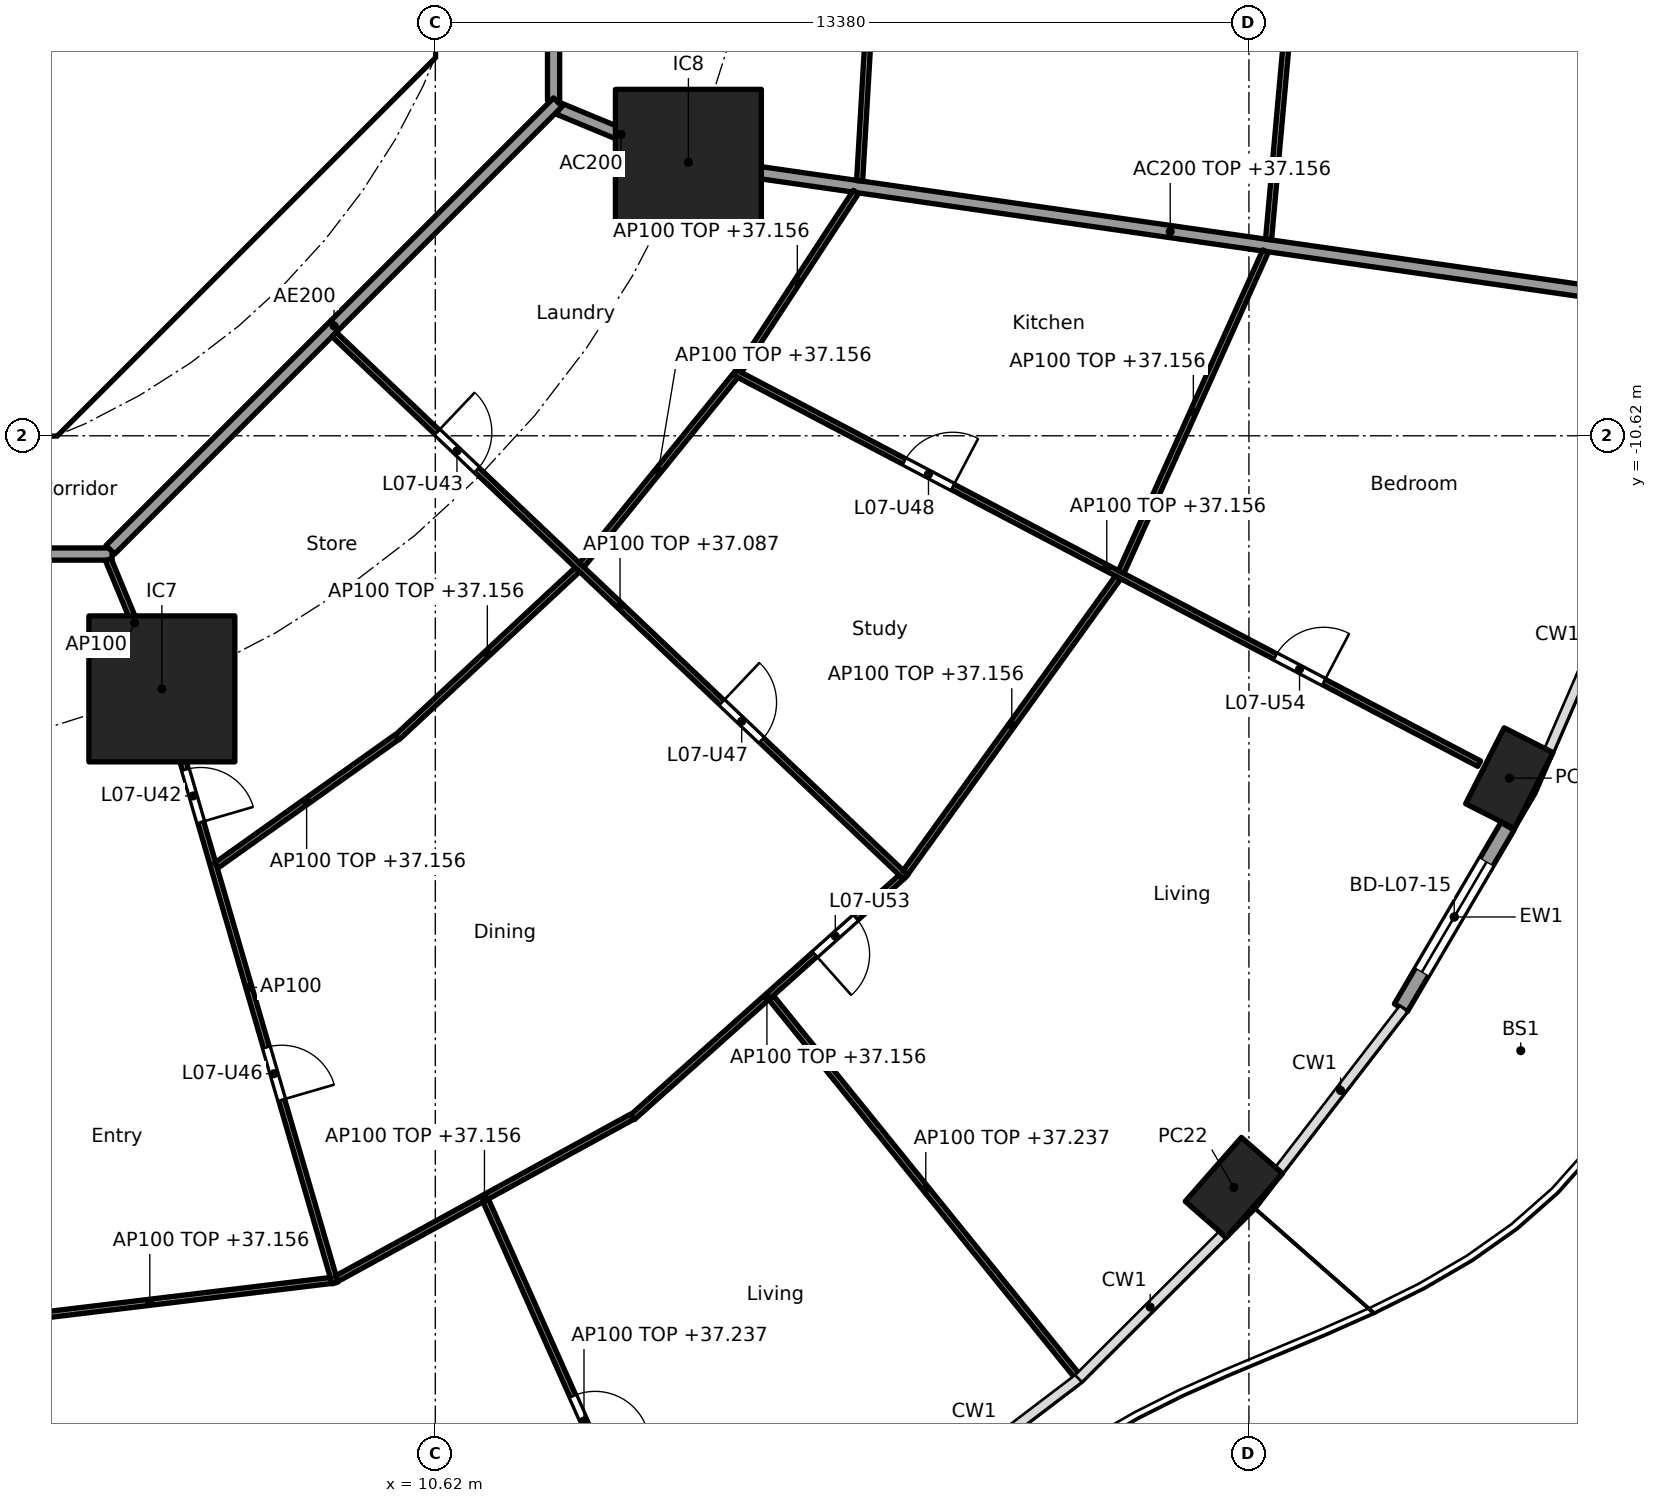
"""IFC4 building model, lengths in metres.
Left out: names, types, materials, properties, quantities, classifications, styles, units other than length and angle.
Written with IfcOpenShell. Run it as: python <this file> out.ifc"""

import sys

from ifc_helpers import new_model, si_unit, direction, frame, frame_2d, origin, origin_2d, place, context, subcontext, project, spatial, polyline, rectangle, hollow_rectangle, outline, extrude, element, fill, save


model = new_model("IFC4")
c1 = context("Model", 3, precision=1e-05, world=origin(), true_north=direction((0.0, 1.0)))
c2 = subcontext(c1, "Body", "Model", "MODEL_VIEW")
j1 = project(units=[si_unit("LENGTHUNIT", "METRE"), si_unit("PLANEANGLEUNIT", "RADIAN")], contexts=[c1])
p1 = place(None, origin())
s1 = spatial("IfcSite", under=j1, at=p1, CompositionType="ELEMENT")
p2 = place(p1, origin())
s2 = spatial("IfcBuilding", under=s1, at=p2, CompositionType="ELEMENT")
p3 = place(p2, frame((0.0, 0.0, 34.4)))
s3 = spatial("IfcBuildingStorey", under=s2, at=p3, CompositionType="ELEMENT", Elevation=34.4)
for number, where, z_axis, x_axis in (
    (1, (23.752, -22.981, 0.0), (0.0, 0.0, 1.0), (0.66, 0.751, 0.0)),
    (2, (28.282, -16.25, 0.0), (0.0, 0.0, 1.0), (0.452, 0.892, 0.0)),
):
    element("IfcColumn", number, at=place(p3, frame(where, z_axis=z_axis, x_axis=x_axis)), inside=s3, PredefinedType="COLUMN", context=c2, shape_type="SweptSolid", body=[
        extrude(hollow_rectangle(XDim=1.4, YDim=0.9, WallThickness=0.05, at=origin_2d()), origin(), (0.0, 0.0, 1.0), 3.7),
    ])
for number, where, z_axis, x_axis in (
    (3, (6.123, -14.782, 0.0), (0.0, 0.0, 1.0), (1.0, 0.0, 0.0)),
    (4, (14.782, -6.123, 0.0), (0.0, 0.0, 1.0), (1.0, 0.0, 0.0)),
):
    element("IfcColumn", number, at=place(p3, frame(where, z_axis=z_axis, x_axis=x_axis)), inside=s3, PredefinedType="COLUMN", context=c2, shape_type="SweptSolid", body=[
        extrude(rectangle(XDim=2.4, YDim=2.4, at=origin_2d()), origin(), (0.0, 0.0, 1.0), 3.7),
    ])
p4 = place(p3, frame((28.252, -17.04, 0.0), z_axis=(0.0, 0.0, 1.0), x_axis=(-0.506311160839, -0.862350861546, 0.0)))
e5 = element("IfcWall", 5, at=p4, inside=s3, PredefinedType="SOLIDWALL", context=c2, shape_type="SweptSolid", body=[
    extrude(rectangle(XDim=3.462, YDim=0.25, at=frame_2d((1.731, 0.0))), origin(), (0.0, 0.0, 1.0), 3.44),
])
p5 = place(p4, frame((0.681, 0.0, 0.0)))
e6 = element("IfcOpeningElement", 6, at=p5, cuts=e5, PredefinedType="OPENING", context=c2, shape_type="SweptSolid", body=[
    extrude(rectangle(XDim=2.1, YDim=2.4, at=frame_2d((1.05, 1.2))), frame((0.0, 0.135, 0.0), z_axis=(0.0, -1.0, 0.0), x_axis=(1.0, 0.0, 0.0)), (0.0, 0.0, 1.0), 0.27),
])
p6 = place(p3, frame((4.613, -9.988, 0.0), z_axis=(0.0, 0.0, 1.0), x_axis=(0.707106781187, 0.707106781187, 0.0)))
e7 = element("IfcWall", 7, at=p6, inside=s3, PredefinedType="SHEAR", context=c2, shape_type="SweptSolid", body=[
    extrude(rectangle(XDim=7.602, YDim=0.6, at=frame_2d((3.801, 0.0))), origin(), (0.0, 0.0, 1.0), 3.44),
])
p7 = place(p6, frame((3.201, 0.0, 0.0)))
e8 = element("IfcOpeningElement", 8, at=p7, cuts=e7, PredefinedType="OPENING", context=c2, shape_type="SweptSolid", body=[
    extrude(rectangle(XDim=1.2, YDim=2.1, at=frame_2d((0.6, 1.05))), frame((0.0, 0.31, 0.0), z_axis=(0.0, -1.0, 0.0), x_axis=(1.0, 0.0, 0.0)), (0.0, 0.0, 1.0), 0.62),
])
p8 = place(p3, origin())
e9 = element("IfcWall", 9, at=p8, inside=s3, PredefinedType="SHEAR", context=c2, shape_type="SweptSolid", body=[
    extrude(outline(polyline([(-4.152, -10.025), (4.152, -10.025), (4.401, -9.776), (4.825, -10.2), (4.401, -10.625), (-4.401, -10.625), (-4.825, -10.2), (-4.401, -9.776), (-4.152, -10.025)])), origin(), (0.0, 0.0, 1.0), 3.44),
])
p9 = place(p3, origin())
e10 = element("IfcWall", 10, at=p9, inside=s3, PredefinedType="SHEAR", context=c2, shape_type="SweptSolid", body=[
    extrude(outline(polyline([(9.776, -4.401), (10.025, -4.152), (10.025, -3.801), (10.025, 4.152), (9.776, 4.401), (10.2, 4.825), (10.625, 4.401), (10.625, -4.401), (10.2, -4.825), (9.776, -4.401)])), origin(), (0.0, 0.0, 1.0), 3.44),
])
p10 = place(p3, frame((12.657, -5.243, 0.0), z_axis=(0.0, 0.0, 1.0), x_axis=(0.923853160736, -0.382747093259, 0.0)))
e11 = element("IfcWall", 11, at=p10, inside=s3, PredefinedType="PARTITIONING", context=c2, shape_type="SweptSolid", body=[
    extrude(rectangle(XDim=2.2, YDim=0.2, at=frame_2d((1.1, 0.0))), origin(), (0.0, 0.0, 1.0), 3.44),
])
p11 = place(p3, frame((14.832, -6.13, 0.0), z_axis=(0.0, 0.0, 1.0), x_axis=(0.989836541293, -0.142209779978, 0.0)))
e12 = element("IfcWall", 12, at=p11, inside=s3, PredefinedType="PARTITIONING", context=c2, shape_type="SweptSolid", body=[
    extrude(rectangle(XDim=15.909, YDim=0.2, at=frame_2d((7.955, 0.0))), origin(), (0.0, 0.0, 1.0), 2.756),
])
p12 = place(p3, frame((12.565, -5.104, 0.0), z_axis=(0.0, 0.0, 1.0), x_axis=(0.0, 1.0, 0.0)))
e13 = element("IfcWall", 13, at=p12, inside=s3, PredefinedType="PARTITIONING", context=c2, shape_type="SweptSolid", body=[
    extrude(rectangle(XDim=10.209, YDim=0.2, at=frame_2d((5.104, 0.0))), origin(), (0.0, 0.0, 1.0), 3.44),
])
p13 = place(p3, frame((-5.104, -12.565, 0.0), z_axis=(0.0, 0.0, 1.0), x_axis=(1.0, 0.0, 0.0)))
e14 = element("IfcWall", 14, at=p13, inside=s3, PredefinedType="PARTITIONING", context=c2, shape_type="SweptSolid", body=[
    extrude(rectangle(XDim=10.409, YDim=0.2, at=frame_2d((5.205, 0.0))), origin(), (0.0, 0.0, 1.0), 3.44),
])
p14 = place(p13, frame((8.074, 0.0, 0.0)))
e15 = element("IfcOpeningElement", 15, at=p14, cuts=e14, PredefinedType="OPENING", context=c2, shape_type="SweptSolid", body=[
    extrude(rectangle(XDim=1.0, YDim=2.1, at=frame_2d((0.5, 1.05))), frame((0.0, 0.11, 0.0), z_axis=(0.0, -1.0, 0.0), x_axis=(1.0, 0.0, 0.0)), (0.0, 0.0, 1.0), 0.22),
])
p15 = place(p3, frame((5.275, -12.494, 0.0), z_axis=(0.0, 0.0, 1.0), x_axis=(0.707106781187, 0.707106781187, 0.0)))
e16 = element("IfcWall", 16, at=p15, inside=s3, PredefinedType="PARTITIONING", context=c2, shape_type="SweptSolid", body=[
    extrude(rectangle(XDim=10.409, YDim=0.2, at=frame_2d((5.205, 0.0))), origin(), (0.0, 0.0, 1.0), 3.44),
])
p16 = place(p3, frame((17.977, 0.05, 0.0), z_axis=(0.0, 0.0, 1.0), x_axis=(-0.058516864568, -0.998286420103, 0.0)))
e17 = element("IfcWall", 17, at=p16, inside=s3, PredefinedType="PARTITIONING", context=c2, shape_type="SweptSolid", body=[
    extrude(rectangle(XDim=6.488, YDim=0.1, at=frame_2d((3.244, 0.0))), origin(), (0.0, 0.0, 1.0), 2.756),
])
p17 = place(p3, frame((24.982, -0.05, 0.0), z_axis=(0.0, 0.0, 1.0), x_axis=(-0.08944290521, -0.995991951126, 0.0)))
e18 = element("IfcWall", 18, at=p17, inside=s3, PredefinedType="PARTITIONING", context=c2, shape_type="SweptSolid", body=[
    extrude(rectangle(XDim=7.373, YDim=0.1, at=frame_2d((3.686, 0.0))), origin(), (0.0, 0.0, 1.0), 2.756),
])
p18 = place(p17, frame((3.236, 0.0, 0.0)))
e19 = element("IfcOpeningElement", 19, at=p18, cuts=e18, PredefinedType="OPENING", context=c2, shape_type="SweptSolid", body=[
    extrude(rectangle(XDim=0.9, YDim=2.1, at=frame_2d((0.45, 1.05))), frame((0.0, 0.06, 0.0), z_axis=(0.0, -1.0, 0.0), x_axis=(1.0, 0.0, 0.0)), (0.0, 0.0, 1.0), 0.12),
])
p19 = place(p3, frame((2.941, -25.229, 0.0), z_axis=(0.0, 0.0, 1.0), x_axis=(0.992836798252, 0.119478416615, 0.0)))
e20 = element("IfcWall", 20, at=p19, inside=s3, PredefinedType="PARTITIONING", context=c2, shape_type="SweptSolid", body=[
    extrude(rectangle(XDim=6.01, YDim=0.1, at=frame_2d((3.005, 0.0))), origin(), (0.0, 0.0, 1.0), 2.756),
])
p20 = place(p3, frame((5.243, -12.657, 0.0), z_axis=(0.0, 0.0, 1.0), x_axis=(0.382719158442, -0.923864733477, 0.0)))
e21 = element("IfcWall", 21, at=p20, inside=s3, PredefinedType="PARTITIONING", context=c2, shape_type="SweptSolid", body=[
    extrude(rectangle(XDim=2.25, YDim=0.1, at=frame_2d((1.125, 0.0))), origin(), (0.0, 0.0, 1.0), 3.44),
])
p21 = place(p3, frame((6.137, -14.83, 0.0), z_axis=(0.0, 0.0, 1.0), x_axis=(0.279843546189, -0.960045618529, 0.0)))
e22 = element("IfcWall", 22, at=p21, inside=s3, PredefinedType="PARTITIONING", context=c2, shape_type="SweptSolid", body=[
    extrude(rectangle(XDim=10.127, YDim=0.1, at=frame_2d((5.063, 0.0))), origin(), (0.0, 0.0, 1.0), 3.44),
])
p22 = place(p21, frame((1.334, 0.0, 0.0)))
e23 = element("IfcOpeningElement", 23, at=p22, cuts=e22, PredefinedType="OPENING", context=c2, shape_type="SweptSolid", body=[
    extrude(rectangle(XDim=0.9, YDim=2.1, at=frame_2d((0.45, 1.05))), frame((0.0, 0.06, 0.0), z_axis=(0.0, -1.0, 0.0), x_axis=(1.0, 0.0, 0.0)), (0.0, 0.0, 1.0), 0.12),
])
p23 = place(p21, frame((6.091, 0.0, 0.0)))
e24 = element("IfcOpeningElement", 24, at=p23, cuts=e22, PredefinedType="OPENING", context=c2, shape_type="SweptSolid", body=[
    extrude(rectangle(XDim=0.9, YDim=2.1, at=frame_2d((0.45, 1.05))), frame((0.0, 0.06, 0.0), z_axis=(0.0, -1.0, 0.0), x_axis=(1.0, 0.0, 0.0)), (0.0, 0.0, 1.0), 0.12),
])
p24 = place(p3, frame((7.019, -17.686, 0.0), z_axis=(0.0, 0.0, 1.0), x_axis=(0.81494477814, 0.57953861699, 0.0)))
e25 = element("IfcWall", 25, at=p24, inside=s3, PredefinedType="PARTITIONING", context=c2, shape_type="SweptSolid", body=[
    extrude(rectangle(XDim=3.644, YDim=0.1, at=frame_2d((1.822, 0.0))), origin(), (0.0, 0.0, 1.0), 2.756),
])
p25 = place(p3, frame((9.001, -24.48, 0.0), z_axis=(0.0, 0.0, 1.0), x_axis=(0.876794415294, 0.480865421203, 0.0)))
e26 = element("IfcWall", 26, at=p25, inside=s3, PredefinedType="PARTITIONING", context=c2, shape_type="SweptSolid", body=[
    extrude(rectangle(XDim=5.536, YDim=0.1, at=frame_2d((2.768, 0.0))), origin(), (0.0, 0.0, 1.0), 2.756),
])
p26 = place(p3, frame((11.448, -23.195, 0.0), z_axis=(0.0, 0.0, 1.0), x_axis=(0.407016520798, -0.913420796675, 0.0)))
e27 = element("IfcWall", 27, at=p26, inside=s3, PredefinedType="PARTITIONING", context=c2, shape_type="SweptSolid", body=[
    extrude(rectangle(XDim=7.944, YDim=0.1, at=frame_2d((3.972, 0.0))), origin(), (0.0, 0.0, 1.0), 2.837),
])
p27 = place(p26, frame((3.522, 0.0, 0.0)))
e28 = element("IfcOpeningElement", 28, at=p27, cuts=e27, PredefinedType="OPENING", context=c2, shape_type="SweptSolid", body=[
    extrude(rectangle(XDim=0.9, YDim=2.1, at=frame_2d((0.45, 1.05))), frame((0.0, 0.06, 0.0), z_axis=(0.0, -1.0, 0.0), x_axis=(1.0, 0.0, 0.0)), (0.0, 0.0, 1.0), 0.12),
])
p28 = place(p3, frame((9.993, -15.579, 0.0), z_axis=(0.0, 0.0, 1.0), x_axis=(0.732028724098, 0.681273768096, 0.0)))
e29 = element("IfcWall", 29, at=p28, inside=s3, PredefinedType="PARTITIONING", context=c2, shape_type="SweptSolid", body=[
    extrude(rectangle(XDim=4.05, YDim=0.1, at=frame_2d((2.025, 0.0))), origin(), (0.0, 0.0, 1.0), 2.756),
])
p29 = place(p3, frame((13.862, -21.828, 0.0), z_axis=(0.0, 0.0, 1.0), x_axis=(0.745812746724, 0.666155647596, 0.0)))
e30 = element("IfcWall", 30, at=p29, inside=s3, PredefinedType="PARTITIONING", context=c2, shape_type="SweptSolid", body=[
    extrude(rectangle(XDim=5.931, YDim=0.1, at=frame_2d((2.965, 0.0))), origin(), (0.0, 0.0, 1.0), 2.756),
])
p30 = place(p29, frame((4.023, 0.0, 0.0)))
e31 = element("IfcOpeningElement", 31, at=p30, cuts=e30, PredefinedType="OPENING", context=c2, shape_type="SweptSolid", body=[
    extrude(rectangle(XDim=0.9, YDim=2.1, at=frame_2d((0.45, 1.05))), frame((0.0, 0.06, 0.0), z_axis=(0.0, -1.0, 0.0), x_axis=(1.0, 0.0, 0.0)), (0.0, 0.0, 1.0), 0.12),
])
p31 = place(p3, frame((16.142, -19.858, 0.0), z_axis=(0.0, 0.0, 1.0), x_axis=(0.628738066508, -0.777617157555, 0.0)))
e32 = element("IfcWall", 32, at=p31, inside=s3, PredefinedType="PARTITIONING", context=c2, shape_type="SweptSolid", body=[
    extrude(rectangle(XDim=8.091, YDim=0.1, at=frame_2d((4.045, 0.0))), origin(), (0.0, 0.0, 1.0), 2.837),
])
p32 = place(p3, frame((8.957, -8.953, 0.0), z_axis=(0.0, 0.0, 1.0), x_axis=(0.725250022034, -0.688485588476, 0.0)))
e33 = element("IfcWall", 33, at=p32, inside=s3, PredefinedType="PARTITIONING", context=c2, shape_type="SweptSolid", body=[
    extrude(rectangle(XDim=12.963, YDim=0.1, at=frame_2d((6.481, 0.0))), origin(), (0.0, 0.0, 1.0), 2.687),
])
p33 = place(p32, frame((2.333, 0.0, 0.0)))
e34 = element("IfcOpeningElement", 34, at=p33, cuts=e33, PredefinedType="OPENING", context=c2, shape_type="SweptSolid", body=[
    extrude(rectangle(XDim=0.9, YDim=2.1, at=frame_2d((0.45, 1.05))), frame((0.0, 0.06, 0.0), z_axis=(0.0, -1.0, 0.0), x_axis=(1.0, 0.0, 0.0)), (0.0, 0.0, 1.0), 0.12),
])
p34 = place(p32, frame((8.79, 0.0, 0.0)))
e35 = element("IfcOpeningElement", 35, at=p34, cuts=e33, PredefinedType="OPENING", context=c2, shape_type="SweptSolid", body=[
    extrude(rectangle(XDim=0.9, YDim=2.1, at=frame_2d((0.45, 1.05))), frame((0.0, 0.06, 0.0), z_axis=(0.0, -1.0, 0.0), x_axis=(1.0, 0.0, 0.0)), (0.0, 0.0, 1.0), 0.12),
])
p35 = place(p3, frame((13.026, -12.747, 0.0), z_axis=(0.0, 0.0, 1.0), x_axis=(0.630126826288, 0.776492229705, 0.0)))
e36 = element("IfcWall", 36, at=p35, inside=s3, PredefinedType="PARTITIONING", context=c2, shape_type="SweptSolid", body=[
    extrude(rectangle(XDim=4.007, YDim=0.1, at=frame_2d((2.003, 0.0))), origin(), (0.0, 0.0, 1.0), 2.756),
])
p36 = place(p3, frame((18.351, -17.803, 0.0), z_axis=(0.0, 0.0, 1.0), x_axis=(0.584563700282, 0.811347817099, 0.0)))
e37 = element("IfcWall", 37, at=p36, inside=s3, PredefinedType="PARTITIONING", context=c2, shape_type="SweptSolid", body=[
    extrude(rectangle(XDim=5.984, YDim=0.1, at=frame_2d((2.992, 0.0))), origin(), (0.0, 0.0, 1.0), 2.756),
])
p37 = place(p3, frame((15.538, -9.574, 0.0), z_axis=(0.0, 0.0, 1.0), x_axis=(0.885181406501, -0.465246039838, 0.0)))
e38 = element("IfcWall", 38, at=p37, inside=s3, PredefinedType="PARTITIONING", context=c2, shape_type="SweptSolid", body=[
    extrude(rectangle(XDim=13.837, YDim=0.1, at=frame_2d((6.918, 0.0))), origin(), (0.0, 0.0, 1.0), 2.756),
])
p38 = place(p37, frame((3.156, 0.0, 0.0)))
e39 = element("IfcOpeningElement", 39, at=p38, cuts=e38, PredefinedType="OPENING", context=c2, shape_type="SweptSolid", body=[
    extrude(rectangle(XDim=0.9, YDim=2.1, at=frame_2d((0.45, 1.05))), frame((0.0, 0.06, 0.0), z_axis=(0.0, -1.0, 0.0), x_axis=(1.0, 0.0, 0.0)), (0.0, 0.0, 1.0), 0.12),
])
p39 = place(p37, frame((10.05, 0.0, 0.0)))
e40 = element("IfcOpeningElement", 40, at=p39, cuts=e38, PredefinedType="OPENING", context=c2, shape_type="SweptSolid", body=[
    extrude(rectangle(XDim=0.9, YDim=2.1, at=frame_2d((0.45, 1.05))), frame((0.0, 0.06, 0.0), z_axis=(0.0, -1.0, 0.0), x_axis=(1.0, 0.0, 0.0)), (0.0, 0.0, 1.0), 0.12),
])
p40 = place(p3, frame((15.609, -9.556, 0.0), z_axis=(0.0, 0.0, 1.0), x_axis=(0.547637987196, 0.836715384692, 0.0)))
e41 = element("IfcWall", 41, at=p40, inside=s3, PredefinedType="PARTITIONING", context=c2, shape_type="SweptSolid", body=[
    extrude(rectangle(XDim=3.52, YDim=0.1, at=frame_2d((1.76, 0.0))), origin(), (0.0, 0.0, 1.0), 2.756),
])
p41 = place(p3, frame((21.899, -12.861, 0.0), z_axis=(0.0, 0.0, 1.0), x_axis=(0.410201529109, 0.911994904326, 0.0)))
e42 = element("IfcWall", 42, at=p41, inside=s3, PredefinedType="PARTITIONING", context=c2, shape_type="SweptSolid", body=[
    extrude(rectangle(XDim=5.787, YDim=0.1, at=frame_2d((2.894, 0.0))), origin(), (0.0, 0.0, 1.0), 2.756),
])
p42 = place(p5, origin())
e43 = element("IfcDoor", 43, at=p42, inside=s3, OperationType="SLIDING_TO_LEFT", PredefinedType="DOOR", context=c2, shape_type="SweptSolid", body=[
    extrude(rectangle(XDim=2.1, YDim=2.4, at=frame_2d((1.05, 1.2))), frame((0.0, 0.025, 0.0), z_axis=(0.0, -1.0, 0.0), x_axis=(1.0, 0.0, 0.0)), (0.0, 0.0, 1.0), 0.05),
])
fill(e6, e43)
p43 = place(p7, origin())
e44 = element("IfcDoor", 44, at=p43, inside=s3, OperationType="SINGLE_SWING_RIGHT", PredefinedType="DOOR", context=c2, shape_type="SweptSolid", body=[
    extrude(rectangle(XDim=1.2, YDim=2.1, at=frame_2d((0.6, 1.05))), frame((0.0, 0.025, 0.0), z_axis=(0.0, -1.0, 0.0), x_axis=(1.0, 0.0, 0.0)), (0.0, 0.0, 1.0), 0.05),
])
fill(e8, e44)
p44 = place(p22, origin())
e45 = element("IfcDoor", 45, at=p44, inside=s3, OperationType="SINGLE_SWING_RIGHT", PredefinedType="DOOR", context=c2, shape_type="SweptSolid", body=[
    extrude(rectangle(XDim=0.9, YDim=2.1, at=frame_2d((0.45, 1.05))), frame((0.0, 0.025, 0.0), z_axis=(0.0, -1.0, 0.0), x_axis=(1.0, 0.0, 0.0)), (0.0, 0.0, 1.0), 0.05),
])
fill(e23, e45)
p45 = place(p33, origin())
e46 = element("IfcDoor", 46, at=p45, inside=s3, OperationType="SINGLE_SWING_LEFT", PredefinedType="DOOR", context=c2, shape_type="SweptSolid", body=[
    extrude(rectangle(XDim=0.9, YDim=2.1, at=frame_2d((0.45, 1.05))), frame((0.0, 0.025, 0.0), z_axis=(0.0, -1.0, 0.0), x_axis=(1.0, 0.0, 0.0)), (0.0, 0.0, 1.0), 0.05),
])
fill(e34, e46)
p46 = place(p23, origin())
e47 = element("IfcDoor", 47, at=p46, inside=s3, OperationType="SINGLE_SWING_RIGHT", PredefinedType="DOOR", context=c2, shape_type="SweptSolid", body=[
    extrude(rectangle(XDim=0.9, YDim=2.1, at=frame_2d((0.45, 1.05))), frame((0.0, 0.025, 0.0), z_axis=(0.0, -1.0, 0.0), x_axis=(1.0, 0.0, 0.0)), (0.0, 0.0, 1.0), 0.05),
])
fill(e24, e47)
p47 = place(p34, origin())
e48 = element("IfcDoor", 48, at=p47, inside=s3, OperationType="SINGLE_SWING_LEFT", PredefinedType="DOOR", context=c2, shape_type="SweptSolid", body=[
    extrude(rectangle(XDim=0.9, YDim=2.1, at=frame_2d((0.45, 1.05))), frame((0.0, 0.025, 0.0), z_axis=(0.0, -1.0, 0.0), x_axis=(1.0, 0.0, 0.0)), (0.0, 0.0, 1.0), 0.05),
])
fill(e35, e48)
p48 = place(p38, origin())
e49 = element("IfcDoor", 49, at=p48, inside=s3, OperationType="SINGLE_SWING_RIGHT", PredefinedType="DOOR", context=c2, shape_type="SweptSolid", body=[
    extrude(rectangle(XDim=0.9, YDim=2.1, at=frame_2d((0.45, 1.05))), frame((0.0, 0.025, 0.0), z_axis=(0.0, -1.0, 0.0), x_axis=(1.0, 0.0, 0.0)), (0.0, 0.0, 1.0), 0.05),
])
fill(e39, e49)
p49 = place(p27, origin())
e50 = element("IfcDoor", 50, at=p49, inside=s3, OperationType="SINGLE_SWING_RIGHT", PredefinedType="DOOR", context=c2, shape_type="SweptSolid", body=[
    extrude(rectangle(XDim=0.9, YDim=2.1, at=frame_2d((0.45, 1.05))), frame((0.0, 0.025, 0.0), z_axis=(0.0, -1.0, 0.0), x_axis=(1.0, 0.0, 0.0)), (0.0, 0.0, 1.0), 0.05),
])
fill(e28, e50)
p50 = place(p30, frame((0.9, 0.0, 0.0), x_axis=(-1.0, 0.0, 0.0)))
e51 = element("IfcDoor", 51, at=p50, inside=s3, OperationType="SINGLE_SWING_RIGHT", PredefinedType="DOOR", context=c2, shape_type="SweptSolid", body=[
    extrude(rectangle(XDim=0.9, YDim=2.1, at=frame_2d((0.45, 1.05))), frame((0.0, 0.025, 0.0), z_axis=(0.0, -1.0, 0.0), x_axis=(1.0, 0.0, 0.0)), (0.0, 0.0, 1.0), 0.05),
])
fill(e31, e51)
p51 = place(p39, origin())
e52 = element("IfcDoor", 52, at=p51, inside=s3, OperationType="SINGLE_SWING_RIGHT", PredefinedType="DOOR", context=c2, shape_type="SweptSolid", body=[
    extrude(rectangle(XDim=0.9, YDim=2.1, at=frame_2d((0.45, 1.05))), frame((0.0, 0.025, 0.0), z_axis=(0.0, -1.0, 0.0), x_axis=(1.0, 0.0, 0.0)), (0.0, 0.0, 1.0), 0.05),
])
fill(e40, e52)
save(model, sys.argv[1])
